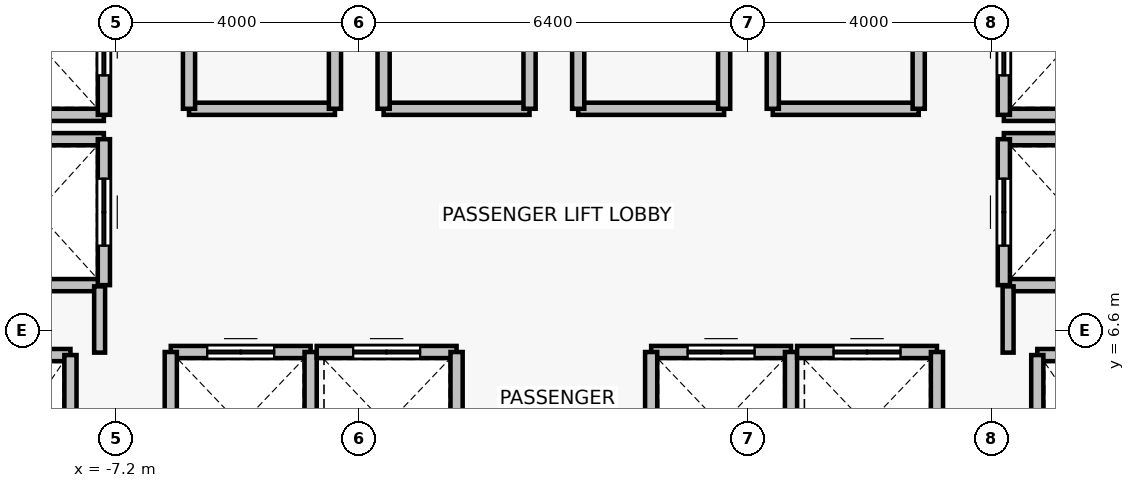
"""IFC4 building model, lengths in metres.
Left out: names, types, materials, properties, quantities, classifications, styles, units other than length and angle.
Written with IfcOpenShell. Run it as: python <this file> out.ifc"""

import sys

from ifc_helpers import new_model, si_unit, direction, frame, frame_2d, origin, place, context, subcontext, project, spatial, rectangle, extrude, source, transform, mapped, element, fill, save


model = new_model("IFC4")
c1 = context("Model", 3, precision=1e-05, world=origin(), true_north=direction((0.0, 1.0)))
c2 = subcontext(c1, "Body", "Model", "MODEL_VIEW")
j1 = project(units=[si_unit("LENGTHUNIT", "METRE"), si_unit("PLANEANGLEUNIT", "RADIAN")], contexts=[c1])
p1 = place(None, origin())
s1 = spatial("IfcSite", under=j1, at=p1, CompositionType="ELEMENT")
p2 = place(p1, origin())
s2 = spatial("IfcBuilding", under=s1, at=p2, CompositionType="ELEMENT")
p3 = place(p2, frame((0.0, 0.0, 86.8)))
s3 = spatial("IfcBuildingStorey", under=s2, at=p3, CompositionType="ELEMENT", Elevation=86.8)
p4 = place(p3, frame((-9.95, 6.2, 0.0), z_axis=(0.0, 0.0, 1.0), x_axis=(1.0, 0.0, 0.0)))
e1 = element("IfcWall", 1, at=p4, inside=s3, PredefinedType="SOLIDWALL", context=c2, shape_type="SweptSolid", body=[
    extrude(rectangle(XDim=2.0, YDim=0.2, at=frame_2d((1.0, 0.0))), origin(), (0.0, 0.0, 1.0), 3.075),
])
p5 = place(p3, frame((-7.95, 6.2, 0.0), z_axis=(0.0, 0.0, 1.0), x_axis=(0.0, -1.0, 0.0)))
e2 = element("IfcWall", 2, at=p5, inside=s3, PredefinedType="SOLIDWALL", context=c2, shape_type="SweptSolid", body=[
    extrude(rectangle(XDim=2.8, YDim=0.2, at=frame_2d((1.4, 0.0))), origin(), (0.0, 0.0, 1.0), 3.075),
])
p6 = place(p3, frame((7.95, 6.2, 0.0), z_axis=(0.0, 0.0, 1.0), x_axis=(1.0, 0.0, 0.0)))
e3 = element("IfcWall", 3, at=p6, inside=s3, PredefinedType="SOLIDWALL", context=c2, shape_type="SweptSolid", body=[
    extrude(rectangle(XDim=2.0, YDim=0.2, at=frame_2d((1.0, 0.0))), origin(), (0.0, 0.0, 1.0), 3.075),
])
p7 = place(p3, frame((7.95, 3.4, 0.0), z_axis=(0.0, 0.0, 1.0), x_axis=(0.0, 1.0, 0.0)))
e4 = element("IfcWall", 4, at=p7, inside=s3, PredefinedType="SOLIDWALL", context=c2, shape_type="SweptSolid", body=[
    extrude(rectangle(XDim=2.8, YDim=0.2, at=frame_2d((1.4, 0.0))), origin(), (0.0, 0.0, 1.0), 3.075),
])
p8 = place(p3, frame((-3.6, 10.25, 0.0), z_axis=(0.0, 0.0, 1.0), x_axis=(-1.0, 0.0, 0.0)))
e5 = element("IfcWall", 5, at=p8, inside=s3, PredefinedType="SOLIDWALL", context=c2, shape_type="SweptSolid", body=[
    extrude(rectangle(XDim=2.4, YDim=0.2, at=frame_2d((1.2, 0.0))), origin(), (0.0, 0.0, 1.0), 2.59),
])
for number, where, z_axis, x_axis in (
    (6, (-6.0, 10.25, 0.0), (0.0, 0.0, 1.0), (0.0, 1.0, 0.0)),
    (7, (-3.6, 12.65, 0.0), (0.0, 0.0, 1.0), (0.0, -1.0, 0.0)),
):
    element("IfcWall", number, at=place(p3, frame(where, z_axis=z_axis, x_axis=x_axis)), inside=s3, PredefinedType="SOLIDWALL", context=c2, shape_type="SweptSolid", body=[
        extrude(rectangle(XDim=2.4, YDim=0.2, at=frame_2d((1.2, 0.0))), origin(), (0.0, 0.0, 1.0), 3.075),
    ])
p9 = place(p3, frame((-0.4, 10.25, 0.0), z_axis=(0.0, 0.0, 1.0), x_axis=(-1.0, 0.0, 0.0)))
e8 = element("IfcWall", 8, at=p9, inside=s3, PredefinedType="SOLIDWALL", context=c2, shape_type="SweptSolid", body=[
    extrude(rectangle(XDim=2.4, YDim=0.2, at=frame_2d((1.2, 0.0))), origin(), (0.0, 0.0, 1.0), 3.075),
])
for number, where, z_axis, x_axis in (
    (9, (-2.8, 10.25, 0.0), (0.0, 0.0, 1.0), (0.0, 1.0, 0.0)),
    (10, (-0.4, 12.65, 0.0), (0.0, 0.0, 1.0), (0.0, -1.0, 0.0)),
):
    element("IfcWall", number, at=place(p3, frame(where, z_axis=z_axis, x_axis=x_axis)), inside=s3, PredefinedType="SOLIDWALL", context=c2, shape_type="SweptSolid", body=[
        extrude(rectangle(XDim=2.4, YDim=0.2, at=frame_2d((1.2, 0.0))), origin(), (0.0, 0.0, 1.0), 3.075),
    ])
p10 = place(p3, frame((2.8, 10.25, 0.0), z_axis=(0.0, 0.0, 1.0), x_axis=(-1.0, 0.0, 0.0)))
e11 = element("IfcWall", 11, at=p10, inside=s3, PredefinedType="SOLIDWALL", context=c2, shape_type="SweptSolid", body=[
    extrude(rectangle(XDim=2.4, YDim=0.2, at=frame_2d((1.2, 0.0))), origin(), (0.0, 0.0, 1.0), 3.075),
])
for number, where, z_axis, x_axis in (
    (12, (0.4, 10.25, 0.0), (0.0, 0.0, 1.0), (0.0, 1.0, 0.0)),
    (13, (2.8, 12.65, 0.0), (0.0, 0.0, 1.0), (0.0, -1.0, 0.0)),
    (14, (6.0, 10.25, 0.0), (0.0, 0.0, 1.0), (-1.0, 0.0, 0.0)),
    (15, (3.6, 10.25, 0.0), (0.0, 0.0, 1.0), (0.0, 1.0, 0.0)),
    (16, (6.0, 12.65, 0.0), (0.0, 0.0, 1.0), (0.0, -1.0, 0.0)),
):
    element("IfcWall", number, at=place(p3, frame(where, z_axis=z_axis, x_axis=x_axis)), inside=s3, PredefinedType="SOLIDWALL", context=c2, shape_type="SweptSolid", body=[
        extrude(rectangle(XDim=2.4, YDim=0.2, at=frame_2d((1.2, 0.0))), origin(), (0.0, 0.0, 1.0), 3.075),
    ])
p11 = place(p3, frame((-6.3, 6.25, 0.0), z_axis=(0.0, 0.0, 1.0), x_axis=(1.0, 0.0, 0.0)))
e17 = element("IfcWall", 17, at=p11, inside=s3, PredefinedType="SOLIDWALL", context=c2, shape_type="SweptSolid", body=[
    extrude(rectangle(XDim=2.3, YDim=0.2, at=frame_2d((1.15, 0.0))), origin(), (0.0, 0.0, 1.0), 3.075),
])
p12 = place(p11, frame((0.6, 0.0, 0.0)))
e18 = element("IfcOpeningElement", 18, at=p12, cuts=e17, PredefinedType="OPENING", context=c2, shape_type="SweptSolid", body=[
    extrude(rectangle(XDim=1.1, YDim=2.2, at=frame_2d((0.55, 1.1))), frame((0.0, 0.11, 0.0), z_axis=(0.0, -1.0, 0.0), x_axis=(1.0, 0.0, 0.0)), (0.0, 0.0, 1.0), 0.22),
])
for number, where, z_axis, x_axis in (
    (19, (-6.3, 3.85, 0.0), (0.0, 0.0, 1.0), (0.0, 1.0, 0.0)),
    (20, (-4.0, 6.25, 0.0), (0.0, 0.0, 1.0), (0.0, -1.0, 0.0)),
):
    element("IfcWall", number, at=place(p3, frame(where, z_axis=z_axis, x_axis=x_axis)), inside=s3, PredefinedType="SOLIDWALL", context=c2, shape_type="SweptSolid", body=[
        extrude(rectangle(XDim=2.4, YDim=0.2, at=frame_2d((1.2, 0.0))), origin(), (0.0, 0.0, 1.0), 3.075),
    ])
p13 = place(p3, frame((-3.9, 6.25, 0.0), z_axis=(0.0, 0.0, 1.0), x_axis=(1.0, 0.0, 0.0)))
e21 = element("IfcWall", 21, at=p13, inside=s3, PredefinedType="SOLIDWALL", context=c2, shape_type="SweptSolid", body=[
    extrude(rectangle(XDim=2.3, YDim=0.2, at=frame_2d((1.15, 0.0))), origin(), (0.0, 0.0, 1.0), 3.075),
])
p14 = place(p13, frame((0.6, 0.0, 0.0)))
e22 = element("IfcOpeningElement", 22, at=p14, cuts=e21, PredefinedType="OPENING", context=c2, shape_type="SweptSolid", body=[
    extrude(rectangle(XDim=1.1, YDim=2.2, at=frame_2d((0.55, 1.1))), frame((0.0, 0.11, 0.0), z_axis=(0.0, -1.0, 0.0), x_axis=(1.0, 0.0, 0.0)), (0.0, 0.0, 1.0), 0.22),
])
p15 = place(p3, frame((-1.6, 6.25, 0.0), z_axis=(0.0, 0.0, 1.0), x_axis=(0.0, -1.0, 0.0)))
e23 = element("IfcWall", 23, at=p15, inside=s3, PredefinedType="SOLIDWALL", context=c2, shape_type="SweptSolid", body=[
    extrude(rectangle(XDim=2.4, YDim=0.2, at=frame_2d((1.2, 0.0))), origin(), (0.0, 0.0, 1.0), 3.075),
])
p16 = place(p3, frame((1.6, 6.25, 0.0), z_axis=(0.0, 0.0, 1.0), x_axis=(1.0, 0.0, 0.0)))
e24 = element("IfcWall", 24, at=p16, inside=s3, PredefinedType="SOLIDWALL", context=c2, shape_type="SweptSolid", body=[
    extrude(rectangle(XDim=2.3, YDim=0.2, at=frame_2d((1.15, 0.0))), origin(), (0.0, 0.0, 1.0), 3.075),
])
p17 = place(p16, frame((0.6, 0.0, 0.0)))
e25 = element("IfcOpeningElement", 25, at=p17, cuts=e24, PredefinedType="OPENING", context=c2, shape_type="SweptSolid", body=[
    extrude(rectangle(XDim=1.1, YDim=2.2, at=frame_2d((0.55, 1.1))), frame((0.0, 0.11, 0.0), z_axis=(0.0, -1.0, 0.0), x_axis=(1.0, 0.0, 0.0)), (0.0, 0.0, 1.0), 0.22),
])
for number, where, z_axis, x_axis in (
    (26, (1.6, 3.85, 0.0), (0.0, 0.0, 1.0), (0.0, 1.0, 0.0)),
    (27, (3.9, 6.25, 0.0), (0.0, 0.0, 1.0), (0.0, -1.0, 0.0)),
):
    element("IfcWall", number, at=place(p3, frame(where, z_axis=z_axis, x_axis=x_axis)), inside=s3, PredefinedType="SOLIDWALL", context=c2, shape_type="SweptSolid", body=[
        extrude(rectangle(XDim=2.4, YDim=0.2, at=frame_2d((1.2, 0.0))), origin(), (0.0, 0.0, 1.0), 3.075),
    ])
p18 = place(p3, frame((4.0, 6.25, 0.0), z_axis=(0.0, 0.0, 1.0), x_axis=(1.0, 0.0, 0.0)))
e28 = element("IfcWall", 28, at=p18, inside=s3, PredefinedType="SOLIDWALL", context=c2, shape_type="SweptSolid", body=[
    extrude(rectangle(XDim=2.3, YDim=0.2, at=frame_2d((1.15, 0.0))), origin(), (0.0, 0.0, 1.0), 3.075),
])
p19 = place(p18, frame((0.6, 0.0, 0.0)))
e29 = element("IfcOpeningElement", 29, at=p19, cuts=e28, PredefinedType="OPENING", context=c2, shape_type="SweptSolid", body=[
    extrude(rectangle(XDim=1.1, YDim=2.2, at=frame_2d((0.55, 1.1))), frame((0.0, 0.11, 0.0), z_axis=(0.0, -1.0, 0.0), x_axis=(1.0, 0.0, 0.0)), (0.0, 0.0, 1.0), 0.22),
])
p20 = place(p3, frame((6.3, 6.25, 0.0), z_axis=(0.0, 0.0, 1.0), x_axis=(0.0, -1.0, 0.0)))
e30 = element("IfcWall", 30, at=p20, inside=s3, PredefinedType="SOLIDWALL", context=c2, shape_type="SweptSolid", body=[
    extrude(rectangle(XDim=2.4, YDim=0.2, at=frame_2d((1.2, 0.0))), origin(), (0.0, 0.0, 1.0), 3.075),
])
for number, where, z_axis, x_axis in (
    (31, (-7.4, 7.35, 0.0), (0.0, 0.0, 1.0), (-1.0, 0.0, 0.0)),
    (32, (-9.6, 9.75, 0.0), (0.0, 0.0, 1.0), (1.0, 0.0, 0.0)),
):
    element("IfcWall", number, at=place(p3, frame(where, z_axis=z_axis, x_axis=x_axis)), inside=s3, PredefinedType="SOLIDWALL", context=c2, shape_type="SweptSolid", body=[
        extrude(rectangle(XDim=2.2, YDim=0.2, at=frame_2d((1.1, 0.0))), origin(), (0.0, 0.0, 1.0), 2.515),
    ])
p21 = place(p3, frame((-7.4, 9.75, 0.0), z_axis=(0.0, 0.0, 1.0), x_axis=(0.0, -1.0, 0.0)))
e33 = element("IfcWall", 33, at=p21, inside=s3, PredefinedType="SOLIDWALL", context=c2, shape_type="SweptSolid", body=[
    extrude(rectangle(XDim=2.4, YDim=0.2, at=frame_2d((1.2, 0.0))), origin(), (0.0, 0.0, 1.0), 2.515),
])
p22 = place(p21, frame((0.65, 0.0, 0.0)))
e34 = element("IfcOpeningElement", 34, at=p22, cuts=e33, PredefinedType="OPENING", context=c2, shape_type="SweptSolid", body=[
    extrude(rectangle(XDim=1.1, YDim=2.2, at=frame_2d((0.55, 1.1))), frame((0.0, 0.11, 0.0), z_axis=(0.0, -1.0, 0.0), x_axis=(1.0, 0.0, 0.0)), (0.0, 0.0, 1.0), 0.22),
])
p23 = place(p3, frame((-7.4, 10.15, 0.0), z_axis=(0.0, 0.0, 1.0), x_axis=(-1.0, 0.0, 0.0)))
e35 = element("IfcWall", 35, at=p23, inside=s3, PredefinedType="SOLIDWALL", context=c2, shape_type="SweptSolid", body=[
    extrude(rectangle(XDim=2.2, YDim=0.2, at=frame_2d((1.1, 0.0))), origin(), (0.0, 0.0, 1.0), 2.515),
])
p24 = place(p3, frame((-7.4, 12.55, 0.0), z_axis=(0.0, 0.0, 1.0), x_axis=(0.0, -1.0, 0.0)))
e36 = element("IfcWall", 36, at=p24, inside=s3, PredefinedType="SOLIDWALL", context=c2, shape_type="SweptSolid", body=[
    extrude(rectangle(XDim=2.4, YDim=0.2, at=frame_2d((1.2, 0.0))), origin(), (0.0, 0.0, 1.0), 2.515),
])
p25 = place(p24, frame((0.65, 0.0, 0.0)))
e37 = element("IfcOpeningElement", 37, at=p25, cuts=e36, PredefinedType="OPENING", context=c2, shape_type="SweptSolid", body=[
    extrude(rectangle(XDim=1.1, YDim=2.2, at=frame_2d((0.55, 1.1))), frame((0.0, 0.11, 0.0), z_axis=(0.0, -1.0, 0.0), x_axis=(1.0, 0.0, 0.0)), (0.0, 0.0, 1.0), 0.22),
])
for number, where, z_axis, x_axis in (
    (38, (9.6, 7.35, 0.0), (0.0, 0.0, 1.0), (-1.0, 0.0, 0.0)),
    (39, (7.4, 9.75, 0.0), (0.0, 0.0, 1.0), (1.0, 0.0, 0.0)),
):
    element("IfcWall", number, at=place(p3, frame(where, z_axis=z_axis, x_axis=x_axis)), inside=s3, PredefinedType="SOLIDWALL", context=c2, shape_type="SweptSolid", body=[
        extrude(rectangle(XDim=2.2, YDim=0.2, at=frame_2d((1.1, 0.0))), origin(), (0.0, 0.0, 1.0), 2.515),
    ])
p26 = place(p3, frame((7.4, 7.35, 0.0), z_axis=(0.0, 0.0, 1.0), x_axis=(0.0, 1.0, 0.0)))
e40 = element("IfcWall", 40, at=p26, inside=s3, PredefinedType="SOLIDWALL", context=c2, shape_type="SweptSolid", body=[
    extrude(rectangle(XDim=2.4, YDim=0.2, at=frame_2d((1.2, 0.0))), origin(), (0.0, 0.0, 1.0), 2.515),
])
p27 = place(p26, frame((0.65, 0.0, 0.0)))
e41 = element("IfcOpeningElement", 41, at=p27, cuts=e40, PredefinedType="OPENING", context=c2, shape_type="SweptSolid", body=[
    extrude(rectangle(XDim=1.1, YDim=2.2, at=frame_2d((0.55, 1.1))), frame((0.0, 0.11, 0.0), z_axis=(0.0, -1.0, 0.0), x_axis=(1.0, 0.0, 0.0)), (0.0, 0.0, 1.0), 0.22),
])
p28 = place(p3, frame((9.6, 10.15, 0.0), z_axis=(0.0, 0.0, 1.0), x_axis=(-1.0, 0.0, 0.0)))
e42 = element("IfcWall", 42, at=p28, inside=s3, PredefinedType="SOLIDWALL", context=c2, shape_type="SweptSolid", body=[
    extrude(rectangle(XDim=2.2, YDim=0.2, at=frame_2d((1.1, 0.0))), origin(), (0.0, 0.0, 1.0), 2.515),
])
p29 = place(p3, frame((7.4, 10.15, 0.0), z_axis=(0.0, 0.0, 1.0), x_axis=(0.0, 1.0, 0.0)))
e43 = element("IfcWall", 43, at=p29, inside=s3, PredefinedType="SOLIDWALL", context=c2, shape_type="SweptSolid", body=[
    extrude(rectangle(XDim=2.4, YDim=0.2, at=frame_2d((1.2, 0.0))), origin(), (0.0, 0.0, 1.0), 2.515),
])
p30 = place(p29, frame((0.65, 0.0, 0.0)))
e44 = element("IfcOpeningElement", 44, at=p30, cuts=e43, PredefinedType="OPENING", context=c2, shape_type="SweptSolid", body=[
    extrude(rectangle(XDim=1.1, YDim=2.2, at=frame_2d((0.55, 1.1))), frame((0.0, 0.11, 0.0), z_axis=(0.0, -1.0, 0.0), x_axis=(1.0, 0.0, 0.0)), (0.0, 0.0, 1.0), 0.22),
])
for number, where, z_axis, x_axis in (
    (45, (-7.47, 7.33, 0.0), (0.0, 0.0, 1.0), (0.0, -1.0, 0.0)),
    (46, (7.47, 6.24, 0.0), (0.0, 0.0, 1.0), (0.0, 1.0, 0.0)),
):
    element("IfcWall", number, at=place(p3, frame(where, z_axis=z_axis, x_axis=x_axis)), inside=s3, PredefinedType="PARTITIONING", context=c2, shape_type="SweptSolid", body=[
        extrude(rectangle(XDim=1.09, YDim=0.18, at=frame_2d((0.545, 0.0))), origin(), (0.0, 0.0, 1.0), 2.515),
    ])
m1 = source(origin(), c2, "Body", "SweptSolid", [
    extrude(rectangle(XDim=1.1, YDim=2.2, at=frame_2d((0.55, 1.1))), frame((0.0, 0.025, 0.0), z_axis=(0.0, -1.0, 0.0), x_axis=(1.0, 0.0, 0.0)), (0.0, 0.0, 1.0), 0.05),
])
p31 = place(p12, origin())
e47 = element("IfcDoor", 47, at=p31, inside=s3, OperationType="DOUBLE_DOOR_SLIDING", PredefinedType="DOOR", context=c2, shape_type="MappedRepresentation", body=[
    mapped(m1, transform((0.0, 0.0, 0.0), x_axis=(1.0, 0.0, 0.0), y_axis=(0.0, 1.0, 0.0), z_axis=(0.0, 0.0, 1.0), scale=1.0)),
])
fill(e18, e47)
p32 = place(p14, origin())
e48 = element("IfcDoor", 48, at=p32, inside=s3, OperationType="DOUBLE_DOOR_SLIDING", PredefinedType="DOOR", context=c2, shape_type="MappedRepresentation", body=[
    mapped(m1, transform((0.0, 0.0, 0.0), x_axis=(1.0, 0.0, 0.0), y_axis=(0.0, 1.0, 0.0), z_axis=(0.0, 0.0, 1.0), scale=1.0)),
])
fill(e22, e48)
p33 = place(p17, origin())
e49 = element("IfcDoor", 49, at=p33, inside=s3, OperationType="DOUBLE_DOOR_SLIDING", PredefinedType="DOOR", context=c2, shape_type="MappedRepresentation", body=[
    mapped(m1, transform((0.0, 0.0, 0.0), x_axis=(1.0, 0.0, 0.0), y_axis=(0.0, 1.0, 0.0), z_axis=(0.0, 0.0, 1.0), scale=1.0)),
])
fill(e25, e49)
p34 = place(p19, origin())
e50 = element("IfcDoor", 50, at=p34, inside=s3, OperationType="DOUBLE_DOOR_SLIDING", PredefinedType="DOOR", context=c2, shape_type="MappedRepresentation", body=[
    mapped(m1, transform((0.0, 0.0, 0.0), x_axis=(1.0, 0.0, 0.0), y_axis=(0.0, 1.0, 0.0), z_axis=(0.0, 0.0, 1.0), scale=1.0)),
])
fill(e29, e50)
p35 = place(p22, origin())
e51 = element("IfcDoor", 51, at=p35, inside=s3, OperationType="DOUBLE_DOOR_SLIDING", PredefinedType="DOOR", context=c2, shape_type="MappedRepresentation", body=[
    mapped(m1, transform((0.0, 0.0, 0.0), x_axis=(1.0, 0.0, 0.0), y_axis=(0.0, 1.0, 0.0), z_axis=(0.0, 0.0, 1.0), scale=1.0)),
])
fill(e34, e51)
p36 = place(p25, origin())
e52 = element("IfcDoor", 52, at=p36, inside=s3, OperationType="DOUBLE_DOOR_SLIDING", PredefinedType="DOOR", context=c2, shape_type="MappedRepresentation", body=[
    mapped(m1, transform((0.0, 0.0, 0.0), x_axis=(1.0, 0.0, 0.0), y_axis=(0.0, 1.0, 0.0), z_axis=(0.0, 0.0, 1.0), scale=1.0)),
])
fill(e37, e52)
p37 = place(p27, origin())
e53 = element("IfcDoor", 53, at=p37, inside=s3, OperationType="DOUBLE_DOOR_SLIDING", PredefinedType="DOOR", context=c2, shape_type="MappedRepresentation", body=[
    mapped(m1, transform((0.0, 0.0, 0.0), x_axis=(1.0, 0.0, 0.0), y_axis=(0.0, 1.0, 0.0), z_axis=(0.0, 0.0, 1.0), scale=1.0)),
])
fill(e41, e53)
p38 = place(p30, origin())
e54 = element("IfcDoor", 54, at=p38, inside=s3, OperationType="DOUBLE_DOOR_SLIDING", PredefinedType="DOOR", context=c2, shape_type="MappedRepresentation", body=[
    mapped(m1, transform((0.0, 0.0, 0.0), x_axis=(1.0, 0.0, 0.0), y_axis=(0.0, 1.0, 0.0), z_axis=(0.0, 0.0, 1.0), scale=1.0)),
])
fill(e44, e54)
save(model, sys.argv[1])
